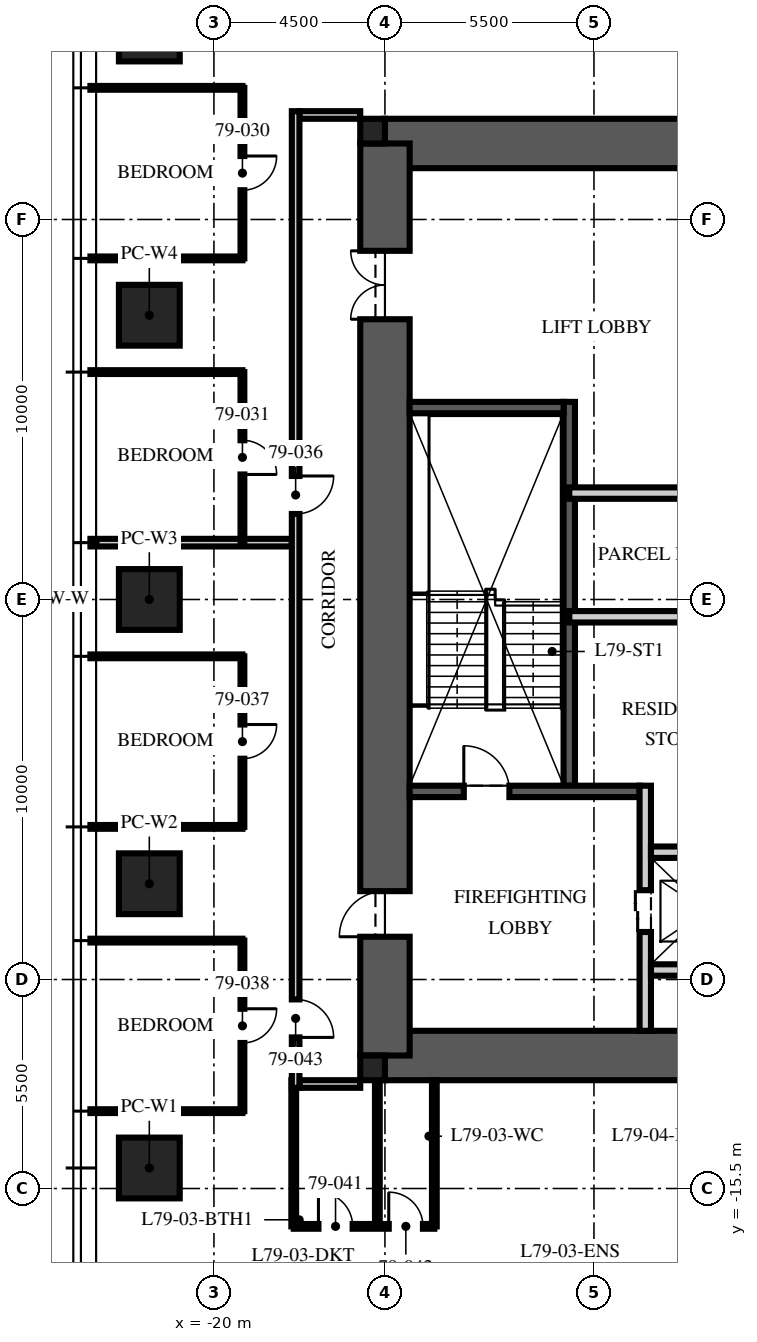
"""IFC4 building model, lengths in metres.
Left out: names, types, materials, properties, quantities, classifications, styles, units other than length and angle.
Written with IfcOpenShell. Run it as: python <this file> out.ifc"""

import sys

from ifc_helpers import new_model, si_unit, direction, frame, frame_2d, origin, origin_2d, place, context, subcontext, project, spatial, rectangle, extrude, element, fill, save


model = new_model("IFC4")
c1 = context("Model", 3, precision=1e-05, world=origin(), true_north=direction((0.0, 1.0)))
c2 = subcontext(c1, "Body", "Model", "MODEL_VIEW")
j1 = project(units=[si_unit("LENGTHUNIT", "METRE"), si_unit("PLANEANGLEUNIT", "RADIAN")], contexts=[c1])
p1 = place(None, origin())
s1 = spatial("IfcSite", under=j1, at=p1, CompositionType="ELEMENT")
p2 = place(p1, origin())
s2 = spatial("IfcBuilding", under=s1, at=p2, CompositionType="ELEMENT")
p3 = place(p2, frame((0.0, 0.0, 315.75)))
s3 = spatial("IfcBuildingStorey", under=s2, at=p3, CompositionType="ELEMENT", Elevation=315.75)
for number, where, z_axis, x_axis in (
    (1, (-15.5, 12.0, -0.25), (0.0, 0.0, 1.0), (1.0, 0.0, 0.0)),
    (2, (-15.5, -12.0, -0.25), (0.0, 0.0, 1.0), (1.0, 0.0, 0.0)),
):
    element("IfcWall", number, at=place(p3, frame(where, z_axis=z_axis, x_axis=x_axis)), inside=s3, PredefinedType="SHEAR", context=c2, shape_type="SweptSolid", body=[
        extrude(rectangle(XDim=31.0, YDim=1.3, at=frame_2d((15.5, 0.0))), origin(), (0.0, 0.0, 1.0), 3.75),
    ])
p4 = place(p3, frame((-15.5, -12.0, -0.25), z_axis=(0.0, 0.0, 1.0), x_axis=(0.0, 1.0, 0.0)))
e3 = element("IfcWall", 3, at=p4, inside=s3, PredefinedType="SHEAR", context=c2, shape_type="SweptSolid", body=[
    extrude(rectangle(XDim=24.0, YDim=1.3, at=frame_2d((12.0, 0.0))), origin(), (0.0, 0.0, 1.0), 3.75),
])
p5 = place(p4, frame((3.125, 0.0, 0.25)))
e4 = element("IfcOpeningElement", 4, at=p5, cuts=e3, PredefinedType="OPENING", context=c2, shape_type="SweptSolid", body=[
    extrude(rectangle(XDim=1.2, YDim=2.1, at=frame_2d((0.6, 1.05))), frame((0.0, 0.66, 0.0), z_axis=(0.0, -1.0, 0.0), x_axis=(1.0, 0.0, 0.0)), (0.0, 0.0, 1.0), 1.32),
])
p6 = place(p4, frame((19.375, 0.0, 0.25)))
e5 = element("IfcOpeningElement", 5, at=p6, cuts=e3, PredefinedType="OPENING", context=c2, shape_type="SweptSolid", body=[
    extrude(rectangle(XDim=1.8, YDim=2.1, at=frame_2d((0.9, 1.05))), frame((0.0, 0.66, 0.0), z_axis=(0.0, -1.0, 0.0), x_axis=(1.0, 0.0, 0.0)), (0.0, 0.0, 1.0), 1.32),
])
for number, where, z_axis, x_axis in (
    (6, (-15.825, 12.325, -0.25), (0.0, 0.0, 1.0), (1.0, 0.0, 0.0)),
    (7, (-15.825, -12.325, -0.25), (0.0, 0.0, 1.0), (1.0, 0.0, 0.0)),
):
    element("IfcColumn", number, at=place(p3, frame(where, z_axis=z_axis, x_axis=x_axis)), inside=s3, PredefinedType="COLUMN", context=c2, shape_type="SweptSolid", body=[
        extrude(rectangle(XDim=0.65, YDim=0.65, at=origin_2d()), origin(), (0.0, 0.0, 1.0), 3.75),
    ])
for number, where, z_axis, x_axis in (
    (8, (-21.7, -14.96, 0.0), (0.0, 0.0, 1.0), (0.0, 1.0, 0.0)),
    (9, (-21.7, -7.48, 0.0), (0.0, 0.0, 1.0), (0.0, 1.0, 0.0)),
    (10, (-21.7, 0.0, 0.0), (0.0, 0.0, 1.0), (0.0, 1.0, 0.0)),
    (11, (-21.7, 7.48, 0.0), (0.0, 0.0, 1.0), (0.0, 1.0, 0.0)),
    (12, (-21.7, 14.96, 0.0), (0.0, 0.0, 1.0), (0.0, 1.0, 0.0)),
):
    element("IfcColumn", number, at=place(p3, frame(where, z_axis=z_axis, x_axis=x_axis)), inside=s3, PredefinedType="COLUMN", context=c2, shape_type="SweptSolid", body=[
        extrude(rectangle(XDim=1.6, YDim=1.6, at=origin_2d()), origin(), (0.0, 0.0, 1.0), 3.75),
    ])
p7 = place(p3, frame((-10.65, -4.9, 0.0), z_axis=(0.0, 0.0, 1.0), x_axis=(0.0, 1.0, 0.0)))
e13 = element("IfcWall", 13, at=p7, inside=s3, PredefinedType="SOLIDWALL", context=c2, shape_type="SweptSolid", body=[
    extrude(rectangle(XDim=10.1, YDim=0.3, at=frame_2d((5.05, 0.0))), origin(), (0.0, 0.0, 1.0), 3.5),
])
p8 = place(p3, frame((-14.85, -5.05, 0.0), z_axis=(0.0, 0.0, 1.0), x_axis=(1.0, 0.0, 0.0)))
e14 = element("IfcWall", 14, at=p8, inside=s3, PredefinedType="SOLIDWALL", context=c2, shape_type="SweptSolid", body=[
    extrude(rectangle(XDim=6.05, YDim=0.3, at=frame_2d((3.025, 0.0))), origin(), (0.0, 0.0, 1.0), 3.5),
])
p9 = place(p8, frame((1.425, 0.0, 0.0)))
e15 = element("IfcOpeningElement", 15, at=p9, cuts=e14, PredefinedType="OPENING", context=c2, shape_type="SweptSolid", body=[
    extrude(rectangle(XDim=1.2, YDim=2.1, at=frame_2d((0.6, 1.05))), frame((0.0, 0.16, 0.0), z_axis=(0.0, -1.0, 0.0), x_axis=(1.0, 0.0, 0.0)), (0.0, 0.0, 1.0), 0.32),
])
p10 = place(p3, frame((-14.85, 5.05, 0.0), z_axis=(0.0, 0.0, 1.0), x_axis=(1.0, 0.0, 0.0)))
e16 = element("IfcWall", 16, at=p10, inside=s3, PredefinedType="SOLIDWALL", context=c2, shape_type="SweptSolid", body=[
    extrude(rectangle(XDim=4.05, YDim=0.3, at=frame_2d((2.025, 0.0))), origin(), (0.0, 0.0, 1.0), 3.5),
])
p11 = place(p3, frame((-8.65, -11.35, 0.0), z_axis=(0.0, 0.0, 1.0), x_axis=(0.0, 1.0, 0.0)))
e17 = element("IfcWall", 17, at=p11, inside=s3, PredefinedType="PARTITIONING", context=c2, shape_type="SweptSolid", body=[
    extrude(rectangle(XDim=6.45, YDim=0.3, at=frame_2d((3.225, 0.0))), origin(), (0.0, 0.0, 1.0), 3.5),
])
p12 = place(p11, frame((2.6, 0.0, 0.0)))
e18 = element("IfcOpeningElement", 18, at=p12, cuts=e17, PredefinedType="OPENING", context=c2, shape_type="SweptSolid", body=[
    extrude(rectangle(XDim=1.1, YDim=2.1, at=frame_2d((0.55, 1.05))), frame((0.0, 0.16, 0.0), z_axis=(0.0, -1.0, 0.0), x_axis=(1.0, 0.0, 0.0)), (0.0, 0.0, 1.0), 0.32),
])
p13 = place(p3, frame((-8.5, -6.65, 0.0), z_axis=(0.0, 0.0, 1.0), x_axis=(1.0, 0.0, 0.0)))
e19 = element("IfcWall", 19, at=p13, inside=s3, PredefinedType="PARTITIONING", context=c2, shape_type="SweptSolid", body=[
    extrude(rectangle(XDim=17.0, YDim=0.3, at=frame_2d((8.5, 0.0))), origin(), (0.0, 0.0, 1.0), 3.5),
])
p14 = place(p13, frame((7.8, 0.0, 0.0)))
e20 = element("IfcOpeningElement", 20, at=p14, cuts=e19, PredefinedType="OPENING", context=c2, shape_type="SweptSolid", body=[
    extrude(rectangle(XDim=1.3, YDim=2.4, at=frame_2d((0.65, 1.2))), frame((0.0, 0.16, 0.0), z_axis=(0.0, -1.0, 0.0), x_axis=(1.0, 0.0, 0.0)), (0.0, 0.0, 1.0), 0.32),
])
p15 = place(p13, frame((5.65, 0.0, 0.0)))
e21 = element("IfcOpeningElement", 21, at=p15, cuts=e19, PredefinedType="OPENING", context=c2, shape_type="SweptSolid", body=[
    extrude(rectangle(XDim=0.9, YDim=2.1, at=frame_2d((0.45, 1.05))), frame((0.0, 0.16, 0.0), z_axis=(0.0, -1.0, 0.0), x_axis=(1.0, 0.0, 0.0)), (0.0, 0.0, 1.0), 0.32),
])
p16 = place(p13, frame((10.4, 0.0, 0.0)))
e22 = element("IfcOpeningElement", 22, at=p16, cuts=e19, PredefinedType="OPENING", context=c2, shape_type="SweptSolid", body=[
    extrude(rectangle(XDim=0.9, YDim=2.1, at=frame_2d((0.45, 1.05))), frame((0.0, 0.16, 0.0), z_axis=(0.0, -1.0, 0.0), x_axis=(1.0, 0.0, 0.0)), (0.0, 0.0, 1.0), 0.32),
])
p17 = place(p3, frame((-8.5, -9.75, 0.0), z_axis=(0.0, 0.0, 1.0), x_axis=(1.0, 0.0, 0.0)))
e23 = element("IfcWall", 23, at=p17, inside=s3, PredefinedType="PARTITIONING", context=c2, shape_type="SweptSolid", body=[
    extrude(rectangle(XDim=2.9, YDim=0.3, at=frame_2d((1.45, 0.0))), origin(), (0.0, 0.0, 1.0), 3.5),
])
p18 = place(p3, frame((-10.65, 2.8, 0.0), z_axis=(0.0, 0.0, 1.0), x_axis=(1.0, 0.0, 0.0)))
e24 = element("IfcWall", 24, at=p18, inside=s3, PredefinedType="PARTITIONING", context=c2, shape_type="SweptSolid", body=[
    extrude(rectangle(XDim=21.3, YDim=0.3, at=frame_2d((10.65, 0.0))), origin(), (0.0, 0.0, 1.0), 3.5),
])
p19 = place(p18, frame((10.05, 0.0, 0.0)))
e25 = element("IfcOpeningElement", 25, at=p19, cuts=e24, PredefinedType="OPENING", context=c2, shape_type="SweptSolid", body=[
    extrude(rectangle(XDim=1.2, YDim=2.1, at=frame_2d((0.6, 1.05))), frame((0.0, 0.16, 0.0), z_axis=(0.0, -1.0, 0.0), x_axis=(1.0, 0.0, 0.0)), (0.0, 0.0, 1.0), 0.32),
])
p20 = place(p18, frame((19.121, 0.0, 0.0)))
e26 = element("IfcOpeningElement", 26, at=p20, cuts=e24, PredefinedType="OPENING", context=c2, shape_type="SweptSolid", body=[
    extrude(rectangle(XDim=0.9, YDim=2.1, at=frame_2d((0.45, 1.05))), frame((0.0, 0.16, 0.0), z_axis=(0.0, -1.0, 0.0), x_axis=(1.0, 0.0, 0.0)), (0.0, 0.0, 1.0), 0.32),
])
p21 = place(p3, frame((-10.65, -0.455, 0.0), z_axis=(0.0, 0.0, 1.0), x_axis=(1.0, 0.0, 0.0)))
e27 = element("IfcWall", 27, at=p21, inside=s3, PredefinedType="PARTITIONING", context=c2, shape_type="SweptSolid", body=[
    extrude(rectangle(XDim=5.55, YDim=0.3, at=frame_2d((2.775, 0.0))), origin(), (0.0, 0.0, 1.0), 3.5),
])
for number, where, z_axis, x_axis in (
    (28, (-16.15, 12.75, 0.0), (0.0, 0.0, 1.0), (-1.0, 0.0, 0.0)),
    (29, (-16.15, -12.75, 0.0), (0.0, 0.0, 1.0), (-1.0, 0.0, 0.0)),
):
    element("IfcWall", number, at=place(p3, frame(where, z_axis=z_axis, x_axis=x_axis)), inside=s3, PredefinedType="PARTITIONING", context=c2, shape_type="SweptSolid", body=[
        extrude(rectangle(XDim=1.6, YDim=0.2, at=frame_2d((0.8, 0.0))), origin(), (0.0, 0.0, 1.0), 2.6),
    ])
for number, where, z_axis, x_axis in (
    (30, (-19.25, 13.464, 0.0), (0.0, 0.0, 1.0), (-1.0, 0.0, 0.0)),
    (31, (-19.25, 8.976, 0.0), (0.0, 0.0, 1.0), (-1.0, 0.0, 0.0)),
    (32, (-19.25, 5.984, 0.0), (0.0, 0.0, 1.0), (-1.0, 0.0, 0.0)),
):
    element("IfcWall", number, at=place(p3, frame(where, z_axis=z_axis, x_axis=x_axis)), inside=s3, PredefinedType="PARTITIONING", context=c2, shape_type="SweptSolid", body=[
        extrude(rectangle(XDim=4.0, YDim=0.1, at=frame_2d((2.0, 0.0))), origin(), (0.0, 0.0, 1.0), 3.01),
    ])
p22 = place(p3, frame((-17.95, 1.496, 0.0), z_axis=(0.0, 0.0, 1.0), x_axis=(-1.0, 0.0, 0.0)))
e33 = element("IfcWall", 33, at=p22, inside=s3, PredefinedType="PARTITIONING", context=c2, shape_type="SweptSolid", body=[
    extrude(rectangle(XDim=5.3, YDim=0.2, at=frame_2d((2.65, 0.0))), origin(), (0.0, 0.0, 1.0), 3.01),
])
for number, where, z_axis, x_axis in (
    (34, (-19.25, -1.496, 0.0), (0.0, 0.0, 1.0), (-1.0, 0.0, 0.0)),
    (35, (-19.25, -5.984, 0.0), (0.0, 0.0, 1.0), (-1.0, 0.0, 0.0)),
    (36, (-19.25, -8.976, 0.0), (0.0, 0.0, 1.0), (-1.0, 0.0, 0.0)),
    (37, (-19.25, -13.464, 0.0), (0.0, 0.0, 1.0), (-1.0, 0.0, 0.0)),
):
    element("IfcWall", number, at=place(p3, frame(where, z_axis=z_axis, x_axis=x_axis)), inside=s3, PredefinedType="PARTITIONING", context=c2, shape_type="SweptSolid", body=[
        extrude(rectangle(XDim=4.0, YDim=0.1, at=frame_2d((2.0, 0.0))), origin(), (0.0, 0.0, 1.0), 3.01),
    ])
p23 = place(p3, frame((-19.25, 13.464, 0.0), z_axis=(0.0, 0.0, 1.0), x_axis=(0.0, -1.0, 0.0)))
e38 = element("IfcWall", 38, at=p23, inside=s3, PredefinedType="PARTITIONING", context=c2, shape_type="SweptSolid", body=[
    extrude(rectangle(XDim=4.488, YDim=0.1, at=frame_2d((2.244, 0.0))), origin(), (0.0, 0.0, 1.0), 2.91),
])
p24 = place(p23, frame((1.794, 0.0, 0.0)))
e39 = element("IfcOpeningElement", 39, at=p24, cuts=e38, PredefinedType="OPENING", context=c2, shape_type="SweptSolid", body=[
    extrude(rectangle(XDim=0.9, YDim=2.1, at=frame_2d((0.45, 1.05))), frame((0.0, 0.06, 0.0), z_axis=(0.0, -1.0, 0.0), x_axis=(1.0, 0.0, 0.0)), (0.0, 0.0, 1.0), 0.12),
])
p25 = place(p3, frame((-19.25, 5.984, 0.0), z_axis=(0.0, 0.0, 1.0), x_axis=(0.0, -1.0, 0.0)))
e40 = element("IfcWall", 40, at=p25, inside=s3, PredefinedType="PARTITIONING", context=c2, shape_type="SweptSolid", body=[
    extrude(rectangle(XDim=4.488, YDim=0.1, at=frame_2d((2.244, 0.0))), origin(), (0.0, 0.0, 1.0), 2.91),
])
p26 = place(p25, frame((1.794, 0.0, 0.0)))
e41 = element("IfcOpeningElement", 41, at=p26, cuts=e40, PredefinedType="OPENING", context=c2, shape_type="SweptSolid", body=[
    extrude(rectangle(XDim=0.9, YDim=2.1, at=frame_2d((0.45, 1.05))), frame((0.0, 0.06, 0.0), z_axis=(0.0, -1.0, 0.0), x_axis=(1.0, 0.0, 0.0)), (0.0, 0.0, 1.0), 0.12),
])
p27 = place(p3, frame((-19.25, -1.496, 0.0), z_axis=(0.0, 0.0, 1.0), x_axis=(0.0, -1.0, 0.0)))
e42 = element("IfcWall", 42, at=p27, inside=s3, PredefinedType="PARTITIONING", context=c2, shape_type="SweptSolid", body=[
    extrude(rectangle(XDim=4.488, YDim=0.1, at=frame_2d((2.244, 0.0))), origin(), (0.0, 0.0, 1.0), 2.91),
])
p28 = place(p27, frame((1.794, 0.0, 0.0)))
e43 = element("IfcOpeningElement", 43, at=p28, cuts=e42, PredefinedType="OPENING", context=c2, shape_type="SweptSolid", body=[
    extrude(rectangle(XDim=0.9, YDim=2.1, at=frame_2d((0.45, 1.05))), frame((0.0, 0.06, 0.0), z_axis=(0.0, -1.0, 0.0), x_axis=(1.0, 0.0, 0.0)), (0.0, 0.0, 1.0), 0.12),
])
p29 = place(p3, frame((-19.25, -8.976, 0.0), z_axis=(0.0, 0.0, 1.0), x_axis=(0.0, -1.0, 0.0)))
e44 = element("IfcWall", 44, at=p29, inside=s3, PredefinedType="PARTITIONING", context=c2, shape_type="SweptSolid", body=[
    extrude(rectangle(XDim=4.488, YDim=0.1, at=frame_2d((2.244, 0.0))), origin(), (0.0, 0.0, 1.0), 2.91),
])
p30 = place(p29, frame((1.794, 0.0, 0.0)))
e45 = element("IfcOpeningElement", 45, at=p30, cuts=e44, PredefinedType="OPENING", context=c2, shape_type="SweptSolid", body=[
    extrude(rectangle(XDim=0.9, YDim=2.1, at=frame_2d((0.45, 1.05))), frame((0.0, 0.06, 0.0), z_axis=(0.0, -1.0, 0.0), x_axis=(1.0, 0.0, 0.0)), (0.0, 0.0, 1.0), 0.12),
])
p31 = place(p3, frame((-17.9, -16.496, 0.0), z_axis=(0.0, 0.0, 1.0), x_axis=(1.0, 0.0, 0.0)))
e46 = element("IfcWall", 46, at=p31, inside=s3, PredefinedType="PARTITIONING", context=c2, shape_type="SweptSolid", body=[
    extrude(rectangle(XDim=3.7, YDim=0.125, at=frame_2d((1.85, 0.0))), origin(), (0.0, 0.0, 1.0), 2.9),
])
p32 = place(p31, frame((0.65, 0.0, 0.0)))
e47 = element("IfcOpeningElement", 47, at=p32, cuts=e46, PredefinedType="OPENING", context=c2, shape_type="SweptSolid", body=[
    extrude(rectangle(XDim=0.9, YDim=2.1, at=frame_2d((0.45, 1.05))), frame((0.0, 0.073, 0.0), z_axis=(0.0, -1.0, 0.0), x_axis=(1.0, 0.0, 0.0)), (0.0, 0.0, 1.0), 0.145),
])
p33 = place(p31, frame((2.5, 0.0, 0.0)))
e48 = element("IfcOpeningElement", 48, at=p33, cuts=e46, PredefinedType="OPENING", context=c2, shape_type="SweptSolid", body=[
    extrude(rectangle(XDim=0.9, YDim=2.1, at=frame_2d((0.45, 1.05))), frame((0.0, 0.073, 0.0), z_axis=(0.0, -1.0, 0.0), x_axis=(1.0, 0.0, 0.0)), (0.0, 0.0, 1.0), 0.145),
])
for number, where, z_axis, x_axis in (
    (49, (-17.9, -12.65, 0.0), (0.0, 0.0, 1.0), (0.0, -1.0, 0.0)),
    (50, (-15.7, -12.65, 0.0), (0.0, 0.0, 1.0), (0.0, -1.0, 0.0)),
):
    element("IfcWall", number, at=place(p3, frame(where, z_axis=z_axis, x_axis=x_axis)), inside=s3, PredefinedType="PARTITIONING", context=c2, shape_type="SweptSolid", body=[
        extrude(rectangle(XDim=3.846, YDim=0.125, at=frame_2d((1.923, 0.0))), origin(), (0.0, 0.0, 1.0), 2.6),
    ])
p34 = place(p3, frame((-14.2, -12.65, 0.0), z_axis=(0.0, 0.0, 1.0), x_axis=(0.0, -1.0, 0.0)))
e51 = element("IfcWall", 51, at=p34, inside=s3, PredefinedType="PARTITIONING", context=c2, shape_type="SweptSolid", body=[
    extrude(rectangle(XDim=3.846, YDim=0.125, at=frame_2d((1.923, 0.0))), origin(), (0.0, 0.0, 1.0), 3.5),
])
p35 = place(p3, frame((-17.85, 12.85, 0.0), z_axis=(0.0, 0.0, 1.0), x_axis=(0.0, -1.0, 0.0)))
e52 = element("IfcWall", 52, at=p35, inside=s3, PredefinedType="PARTITIONING", context=c2, shape_type="SweptSolid", body=[
    extrude(rectangle(XDim=25.7, YDim=0.2, at=frame_2d((12.85, 0.0))), origin(), (0.0, 0.0, 1.0), 2.9),
])
p36 = place(p35, frame((9.6, 0.0, 0.0)))
e53 = element("IfcOpeningElement", 53, at=p36, cuts=e52, PredefinedType="OPENING", context=c2, shape_type="SweptSolid", body=[
    extrude(rectangle(XDim=1.0, YDim=2.2, at=frame_2d((0.5, 1.1))), frame((0.0, 0.11, 0.0), z_axis=(0.0, -1.0, 0.0), x_axis=(1.0, 0.0, 0.0)), (0.0, 0.0, 1.0), 0.22),
])
p37 = place(p35, frame((23.374, 0.0, 0.0)))
e54 = element("IfcOpeningElement", 54, at=p37, cuts=e52, PredefinedType="OPENING", context=c2, shape_type="SweptSolid", body=[
    extrude(rectangle(XDim=1.0, YDim=2.2, at=frame_2d((0.5, 1.1))), frame((0.0, 0.11, 0.0), z_axis=(0.0, -1.0, 0.0), x_axis=(1.0, 0.0, 0.0)), (0.0, 0.0, 1.0), 0.22),
])
p38 = place(p9, origin())
e55 = element("IfcDoor", 55, at=p38, inside=s3, OperationType="SINGLE_SWING_LEFT", PredefinedType="DOOR", context=c2, shape_type="SweptSolid", body=[
    extrude(rectangle(XDim=1.2, YDim=2.1, at=frame_2d((0.6, 1.05))), frame((0.0, 0.025, 0.0), z_axis=(0.0, -1.0, 0.0), x_axis=(1.0, 0.0, 0.0)), (0.0, 0.0, 1.0), 0.05),
])
fill(e15, e55)
p39 = place(p5, origin())
e56 = element("IfcDoor", 56, at=p39, inside=s3, OperationType="SINGLE_SWING_LEFT", PredefinedType="DOOR", context=c2, shape_type="SweptSolid", body=[
    extrude(rectangle(XDim=1.2, YDim=2.1, at=frame_2d((0.6, 1.05))), frame((0.0, 0.025, 0.0), z_axis=(0.0, -1.0, 0.0), x_axis=(1.0, 0.0, 0.0)), (0.0, 0.0, 1.0), 0.05),
])
fill(e4, e56)
p40 = place(p6, origin())
e57 = element("IfcDoor", 57, at=p40, inside=s3, OperationType="DOUBLE_DOOR_SINGLE_SWING", PredefinedType="DOOR", context=c2, shape_type="SweptSolid", body=[
    extrude(rectangle(XDim=1.8, YDim=2.1, at=frame_2d((0.9, 1.05))), frame((0.0, 0.025, 0.0), z_axis=(0.0, -1.0, 0.0), x_axis=(1.0, 0.0, 0.0)), (0.0, 0.0, 1.0), 0.05),
])
fill(e5, e57)
p41 = place(p12, origin())
e58 = element("IfcDoor", 58, at=p41, inside=s3, OperationType="DOUBLE_DOOR_SLIDING", PredefinedType="DOOR", context=c2, shape_type="SweptSolid", body=[
    extrude(rectangle(XDim=1.1, YDim=2.1, at=frame_2d((0.55, 1.05))), frame((0.0, 0.025, 0.0), z_axis=(0.0, -1.0, 0.0), x_axis=(1.0, 0.0, 0.0)), (0.0, 0.0, 1.0), 0.05),
])
fill(e18, e58)
p42 = place(p24, origin())
e59 = element("IfcDoor", 59, at=p42, inside=s3, OperationType="SINGLE_SWING_LEFT", PredefinedType="DOOR", context=c2, shape_type="SweptSolid", body=[
    extrude(rectangle(XDim=0.9, YDim=2.1, at=frame_2d((0.45, 1.05))), frame((0.0, 0.025, 0.0), z_axis=(0.0, -1.0, 0.0), x_axis=(1.0, 0.0, 0.0)), (0.0, 0.0, 1.0), 0.05),
])
fill(e39, e59)
p43 = place(p26, origin())
e60 = element("IfcDoor", 60, at=p43, inside=s3, OperationType="SINGLE_SWING_RIGHT", PredefinedType="DOOR", context=c2, shape_type="SweptSolid", body=[
    extrude(rectangle(XDim=0.9, YDim=2.1, at=frame_2d((0.45, 1.05))), frame((0.0, 0.025, 0.0), z_axis=(0.0, -1.0, 0.0), x_axis=(1.0, 0.0, 0.0)), (0.0, 0.0, 1.0), 0.05),
])
fill(e41, e60)
p44 = place(p36, origin())
e61 = element("IfcDoor", 61, at=p44, inside=s3, OperationType="SINGLE_SWING_LEFT", PredefinedType="DOOR", context=c2, shape_type="SweptSolid", body=[
    extrude(rectangle(XDim=1.0, YDim=2.2, at=frame_2d((0.5, 1.1))), frame((0.0, 0.025, 0.0), z_axis=(0.0, -1.0, 0.0), x_axis=(1.0, 0.0, 0.0)), (0.0, 0.0, 1.0), 0.05),
])
fill(e53, e61)
p45 = place(p28, origin())
e62 = element("IfcDoor", 62, at=p45, inside=s3, OperationType="SINGLE_SWING_LEFT", PredefinedType="DOOR", context=c2, shape_type="SweptSolid", body=[
    extrude(rectangle(XDim=0.9, YDim=2.1, at=frame_2d((0.45, 1.05))), frame((0.0, 0.025, 0.0), z_axis=(0.0, -1.0, 0.0), x_axis=(1.0, 0.0, 0.0)), (0.0, 0.0, 1.0), 0.05),
])
fill(e43, e62)
p46 = place(p30, origin())
e63 = element("IfcDoor", 63, at=p46, inside=s3, OperationType="SINGLE_SWING_LEFT", PredefinedType="DOOR", context=c2, shape_type="SweptSolid", body=[
    extrude(rectangle(XDim=0.9, YDim=2.1, at=frame_2d((0.45, 1.05))), frame((0.0, 0.025, 0.0), z_axis=(0.0, -1.0, 0.0), x_axis=(1.0, 0.0, 0.0)), (0.0, 0.0, 1.0), 0.05),
])
fill(e45, e63)
p47 = place(p32, origin())
e64 = element("IfcDoor", 64, at=p47, inside=s3, OperationType="SINGLE_SWING_LEFT", PredefinedType="DOOR", context=c2, shape_type="SweptSolid", body=[
    extrude(rectangle(XDim=0.9, YDim=2.1, at=frame_2d((0.45, 1.05))), frame((0.0, 0.025, 0.0), z_axis=(0.0, -1.0, 0.0), x_axis=(1.0, 0.0, 0.0)), (0.0, 0.0, 1.0), 0.05),
])
fill(e47, e64)
p48 = place(p33, origin())
e65 = element("IfcDoor", 65, at=p48, inside=s3, OperationType="SINGLE_SWING_LEFT", PredefinedType="DOOR", context=c2, shape_type="SweptSolid", body=[
    extrude(rectangle(XDim=0.9, YDim=2.1, at=frame_2d((0.45, 1.05))), frame((0.0, 0.025, 0.0), z_axis=(0.0, -1.0, 0.0), x_axis=(1.0, 0.0, 0.0)), (0.0, 0.0, 1.0), 0.05),
])
fill(e48, e65)
p49 = place(p37, origin())
e66 = element("IfcDoor", 66, at=p49, inside=s3, OperationType="SINGLE_SWING_RIGHT", PredefinedType="DOOR", context=c2, shape_type="SweptSolid", body=[
    extrude(rectangle(XDim=1.0, YDim=2.2, at=frame_2d((0.5, 1.1))), frame((0.0, 0.025, 0.0), z_axis=(0.0, -1.0, 0.0), x_axis=(1.0, 0.0, 0.0)), (0.0, 0.0, 1.0), 0.05),
])
fill(e54, e66)
save(model, sys.argv[1])
